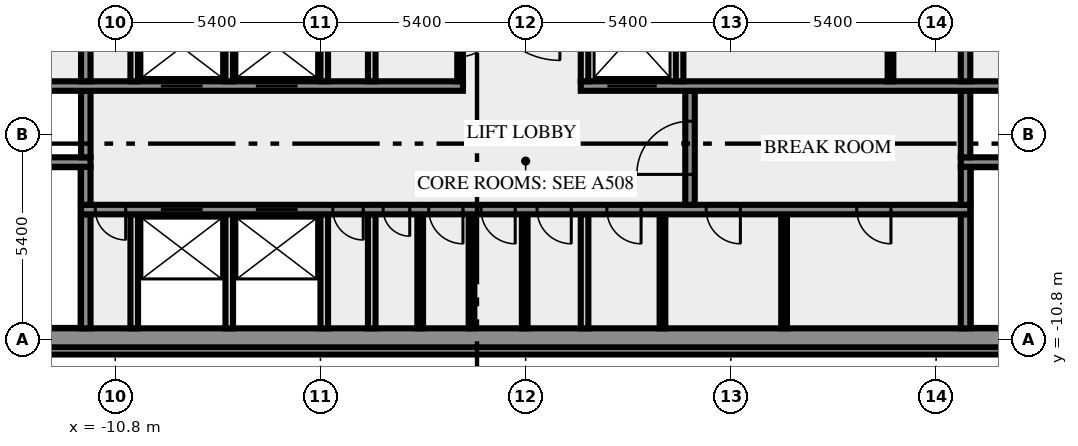
"""IFC4 building model, lengths in metres.
Left out: names, types, materials, properties, quantities, classifications, styles, units other than length and angle.
Written with IfcOpenShell. Run it as: python <this file> out.ifc"""

import sys

from ifc_helpers import new_model, si_unit, direction, frame, frame_2d, origin, place, context, subcontext, project, spatial, rectangle, extrude, element, fill, save


model = new_model("IFC4")
c1 = context("Model", 3, precision=1e-05, world=origin(), true_north=direction((0.0, 1.0)))
c2 = subcontext(c1, "Body", "Model", "MODEL_VIEW")
j1 = project(units=[si_unit("LENGTHUNIT", "METRE"), si_unit("PLANEANGLEUNIT", "RADIAN")], contexts=[c1])
p1 = place(None, origin())
s1 = spatial("IfcSite", under=j1, at=p1, CompositionType="ELEMENT")
p2 = place(p1, origin())
s2 = spatial("IfcBuilding", under=s1, at=p2, CompositionType="ELEMENT")
p3 = place(p2, frame((0.0, 0.0, 265.0)))
s3 = spatial("IfcBuildingStorey", under=s2, at=p3, CompositionType="ELEMENT", Elevation=265.0)
p4 = place(p3, frame((-17.444, -11.088, 0.0), z_axis=(0.0, 0.0, 1.0), x_axis=(1.0, 0.0, 0.0)))
e1 = element("IfcWall", 1, at=p4, inside=s3, PredefinedType="SOLIDWALL", context=c2, shape_type="SweptSolid", body=[
    extrude(rectangle(XDim=34.888, YDim=0.2, at=frame_2d((17.444, 0.0))), origin(), (0.0, 0.0, 1.0), 3.65),
])
p5 = place(p3, frame((-20.0, -10.75, 0.0), z_axis=(0.0, 0.0, 1.0), x_axis=(1.0, 0.0, 0.0)))
e2 = element("IfcWall", 2, at=p5, inside=s3, PredefinedType="SHEAR", context=c2, shape_type="SweptSolid", body=[
    extrude(rectangle(XDim=40.0, YDim=0.5, at=frame_2d((20.0, 0.0))), origin(), (0.0, 0.0, 1.0), 3.65),
])
p6 = place(p5, frame((0.8, 0.0, 1.0)))
e3 = element("IfcOpeningElement", 3, at=p6, cuts=e2, PredefinedType="OPENING", context=c2, shape_type="SweptSolid", body=[
    extrude(rectangle(XDim=1.2, YDim=1.2, at=frame_2d((0.6, 0.6))), frame((0.0, 0.26, 0.0), z_axis=(0.0, -1.0, 0.0), x_axis=(1.0, 0.0, 0.0)), (0.0, 0.0, 1.0), 0.52),
])
p7 = place(p5, frame((38.0, 0.0, 1.0)))
e4 = element("IfcOpeningElement", 4, at=p7, cuts=e2, PredefinedType="OPENING", context=c2, shape_type="SweptSolid", body=[
    extrude(rectangle(XDim=1.2, YDim=1.2, at=frame_2d((0.6, 0.6))), frame((0.0, 0.26, 0.0), z_axis=(0.0, -1.0, 0.0), x_axis=(1.0, 0.0, 0.0)), (0.0, 0.0, 1.0), 0.52),
])
p8 = place(p3, frame((-11.575, -10.5, 0.0), z_axis=(0.0, 0.0, 1.0), x_axis=(0.0, 1.0, 0.0)))
e5 = element("IfcWall", 5, at=p8, inside=s3, PredefinedType="SHEAR", context=c2, shape_type="SweptSolid", body=[
    extrude(rectangle(XDim=3.0, YDim=0.25, at=frame_2d((1.5, 0.0))), origin(), (0.0, 0.0, 1.0), 3.65),
])
for number, where, z_axis, x_axis in (
    (6, (-10.3, -10.5, 0.0), (0.0, 0.0, 1.0), (0.0, 1.0, 0.0)),
    (7, (-7.8, -10.5, 0.0), (0.0, 0.0, 1.0), (0.0, 1.0, 0.0)),
    (8, (-5.3, -10.5, 0.0), (0.0, 0.0, 1.0), (0.0, 1.0, 0.0)),
    (9, (-4.05, -10.5, 0.0), (0.0, 0.0, 1.0), (0.0, 1.0, 0.0)),
):
    element("IfcWall", number, at=place(p3, frame(where, z_axis=z_axis, x_axis=x_axis)), inside=s3, PredefinedType="SOLIDWALL", context=c2, shape_type="SweptSolid", body=[
        extrude(rectangle(XDim=3.0, YDim=0.2, at=frame_2d((1.5, 0.0))), origin(), (0.0, 0.0, 1.0), 3.65),
    ])
for number, where, z_axis, x_axis in (
    (10, (-2.775, -10.5, 0.0), (0.0, 0.0, 1.0), (0.0, 1.0, 0.0)),
    (11, (-1.425, -10.5, 0.0), (0.0, 0.0, 1.0), (0.0, 1.0, 0.0)),
    (12, (-0.025, -10.5, 0.0), (0.0, 0.0, 1.0), (0.0, 1.0, 0.0)),
):
    element("IfcWall", number, at=place(p3, frame(where, z_axis=z_axis, x_axis=x_axis)), inside=s3, PredefinedType="PARTITIONING", context=c2, shape_type="SweptSolid", body=[
        extrude(rectangle(XDim=3.0, YDim=0.15, at=frame_2d((1.5, 0.0))), origin(), (0.0, 0.0, 1.0), 3.65),
    ])
p9 = place(p3, frame((1.55, -10.5, 0.0), z_axis=(0.0, 0.0, 1.0), x_axis=(0.0, 1.0, 0.0)))
e13 = element("IfcWall", 13, at=p9, inside=s3, PredefinedType="SOLIDWALL", context=c2, shape_type="SweptSolid", body=[
    extrude(rectangle(XDim=3.0, YDim=0.2, at=frame_2d((1.5, 0.0))), origin(), (0.0, 0.0, 1.0), 3.65),
])
for number, where, z_axis, x_axis in (
    (14, (3.6, -10.5, 0.0), (0.0, 0.0, 1.0), (0.0, 1.0, 0.0)),
    (15, (6.8, -10.5, 0.0), (0.0, 0.0, 1.0), (0.0, 1.0, 0.0)),
):
    element("IfcWall", number, at=place(p3, frame(where, z_axis=z_axis, x_axis=x_axis)), inside=s3, PredefinedType="PARTITIONING", context=c2, shape_type="SweptSolid", body=[
        extrude(rectangle(XDim=3.0, YDim=0.15, at=frame_2d((1.5, 0.0))), origin(), (0.0, 0.0, 1.0), 3.65),
    ])
p10 = place(p3, frame((11.575, -10.5, 0.0), z_axis=(0.0, 0.0, 1.0), x_axis=(0.0, 1.0, 0.0)))
e16 = element("IfcWall", 16, at=p10, inside=s3, PredefinedType="SHEAR", context=c2, shape_type="SweptSolid", body=[
    extrude(rectangle(XDim=3.0, YDim=0.25, at=frame_2d((1.5, 0.0))), origin(), (0.0, 0.0, 1.0), 3.65),
])
p11 = place(p3, frame((11.7, -7.375, 0.0), z_axis=(0.0, 0.0, 1.0), x_axis=(-1.0, 0.0, 0.0)))
e17 = element("IfcWall", 17, at=p11, inside=s3, PredefinedType="SHEAR", context=c2, shape_type="SweptSolid", body=[
    extrude(rectangle(XDim=23.4, YDim=0.25, at=frame_2d((11.7, 0.0))), origin(), (0.0, 0.0, 1.0), 3.65),
])
p12 = place(p11, frame((22.225, 0.0, 0.0)))
e18 = element("IfcOpeningElement", 18, at=p12, cuts=e17, PredefinedType="OPENING", context=c2, shape_type="SweptSolid", body=[
    extrude(rectangle(XDim=0.8, YDim=2.1, at=frame_2d((0.4, 1.05))), frame((0.0, 0.135, 0.0), z_axis=(0.0, -1.0, 0.0), x_axis=(1.0, 0.0, 0.0)), (0.0, 0.0, 1.0), 0.27),
])
p13 = place(p11, frame((20.2, 0.0, 0.0)))
e19 = element("IfcOpeningElement", 19, at=p13, cuts=e17, PredefinedType="OPENING", context=c2, shape_type="SweptSolid", body=[
    extrude(rectangle(XDim=1.1, YDim=2.1, at=frame_2d((0.55, 1.05))), frame((0.0, 0.135, 0.0), z_axis=(0.0, -1.0, 0.0), x_axis=(1.0, 0.0, 0.0)), (0.0, 0.0, 1.0), 0.27),
])
p14 = place(p11, frame((17.7, 0.0, 0.0)))
e20 = element("IfcOpeningElement", 20, at=p14, cuts=e17, PredefinedType="OPENING", context=c2, shape_type="SweptSolid", body=[
    extrude(rectangle(XDim=1.1, YDim=2.1, at=frame_2d((0.55, 1.05))), frame((0.0, 0.135, 0.0), z_axis=(0.0, -1.0, 0.0), x_axis=(1.0, 0.0, 0.0)), (0.0, 0.0, 1.0), 0.27),
])
p15 = place(p11, frame((15.975, 0.0, 0.0)))
e21 = element("IfcOpeningElement", 21, at=p15, cuts=e17, PredefinedType="OPENING", context=c2, shape_type="SweptSolid", body=[
    extrude(rectangle(XDim=0.8, YDim=2.1, at=frame_2d((0.4, 1.05))), frame((0.0, 0.135, 0.0), z_axis=(0.0, -1.0, 0.0), x_axis=(1.0, 0.0, 0.0)), (0.0, 0.0, 1.0), 0.27),
])
p16 = place(p11, frame((14.75, 0.0, 0.0)))
e22 = element("IfcOpeningElement", 22, at=p16, cuts=e17, PredefinedType="OPENING", context=c2, shape_type="SweptSolid", body=[
    extrude(rectangle(XDim=0.7, YDim=2.1, at=frame_2d((0.35, 1.05))), frame((0.0, 0.135, 0.0), z_axis=(0.0, -1.0, 0.0), x_axis=(1.0, 0.0, 0.0)), (0.0, 0.0, 1.0), 0.27),
])
p17 = place(p11, frame((13.35, 0.0, 0.0)))
e23 = element("IfcOpeningElement", 23, at=p17, cuts=e17, PredefinedType="OPENING", context=c2, shape_type="SweptSolid", body=[
    extrude(rectangle(XDim=0.9, YDim=2.1, at=frame_2d((0.45, 1.05))), frame((0.0, 0.135, 0.0), z_axis=(0.0, -1.0, 0.0), x_axis=(1.0, 0.0, 0.0)), (0.0, 0.0, 1.0), 0.27),
])
p18 = place(p11, frame((11.975, 0.0, 0.0)))
e24 = element("IfcOpeningElement", 24, at=p18, cuts=e17, PredefinedType="OPENING", context=c2, shape_type="SweptSolid", body=[
    extrude(rectangle(XDim=0.9, YDim=2.1, at=frame_2d((0.45, 1.05))), frame((0.0, 0.135, 0.0), z_axis=(0.0, -1.0, 0.0), x_axis=(1.0, 0.0, 0.0)), (0.0, 0.0, 1.0), 0.27),
])
p19 = place(p11, frame((10.5, 0.0, 0.0)))
e25 = element("IfcOpeningElement", 25, at=p19, cuts=e17, PredefinedType="OPENING", context=c2, shape_type="SweptSolid", body=[
    extrude(rectangle(XDim=0.9, YDim=2.1, at=frame_2d((0.45, 1.05))), frame((0.0, 0.135, 0.0), z_axis=(0.0, -1.0, 0.0), x_axis=(1.0, 0.0, 0.0)), (0.0, 0.0, 1.0), 0.27),
])
p20 = place(p11, frame((8.663, 0.0, 0.0)))
e26 = element("IfcOpeningElement", 26, at=p20, cuts=e17, PredefinedType="OPENING", context=c2, shape_type="SweptSolid", body=[
    extrude(rectangle(XDim=0.9, YDim=2.1, at=frame_2d((0.45, 1.05))), frame((0.0, 0.135, 0.0), z_axis=(0.0, -1.0, 0.0), x_axis=(1.0, 0.0, 0.0)), (0.0, 0.0, 1.0), 0.27),
])
p21 = place(p11, frame((6.05, 0.0, 0.0)))
e27 = element("IfcOpeningElement", 27, at=p21, cuts=e17, PredefinedType="OPENING", context=c2, shape_type="SweptSolid", body=[
    extrude(rectangle(XDim=0.9, YDim=2.1, at=frame_2d((0.45, 1.05))), frame((0.0, 0.135, 0.0), z_axis=(0.0, -1.0, 0.0), x_axis=(1.0, 0.0, 0.0)), (0.0, 0.0, 1.0), 0.27),
])
p22 = place(p11, frame((2.088, 0.0, 0.0)))
e28 = element("IfcOpeningElement", 28, at=p22, cuts=e17, PredefinedType="OPENING", context=c2, shape_type="SweptSolid", body=[
    extrude(rectangle(XDim=0.9, YDim=2.1, at=frame_2d((0.45, 1.05))), frame((0.0, 0.135, 0.0), z_axis=(0.0, -1.0, 0.0), x_axis=(1.0, 0.0, 0.0)), (0.0, 0.0, 1.0), 0.27),
])
p23 = place(p3, frame((-11.575, -7.25, 0.0), z_axis=(0.0, 0.0, 1.0), x_axis=(0.0, 1.0, 0.0)))
e29 = element("IfcWall", 29, at=p23, inside=s3, PredefinedType="SHEAR", context=c2, shape_type="SweptSolid", body=[
    extrude(rectangle(XDim=1.0, YDim=0.25, at=frame_2d((0.5, 0.0))), origin(), (0.0, 0.0, 1.0), 3.65),
])
p24 = place(p3, frame((4.325, -7.25, 0.0), z_axis=(0.0, 0.0, 1.0), x_axis=(0.0, 1.0, 0.0)))
e30 = element("IfcWall", 30, at=p24, inside=s3, PredefinedType="SHEAR", context=c2, shape_type="SweptSolid", body=[
    extrude(rectangle(XDim=3.0, YDim=0.25, at=frame_2d((1.5, 0.0))), origin(), (0.0, 0.0, 1.0), 3.65),
])
p25 = place(p24, frame((0.8, 0.0, 0.0)))
e31 = element("IfcOpeningElement", 31, at=p25, cuts=e30, PredefinedType="OPENING", context=c2, shape_type="SweptSolid", body=[
    extrude(rectangle(XDim=1.4, YDim=2.1, at=frame_2d((0.7, 1.05))), frame((0.0, 0.135, 0.0), z_axis=(0.0, -1.0, 0.0), x_axis=(1.0, 0.0, 0.0)), (0.0, 0.0, 1.0), 0.27),
])
p26 = place(p3, frame((11.575, -7.25, 0.0), z_axis=(0.0, 0.0, 1.0), x_axis=(0.0, 1.0, 0.0)))
e32 = element("IfcWall", 32, at=p26, inside=s3, PredefinedType="SHEAR", context=c2, shape_type="SweptSolid", body=[
    extrude(rectangle(XDim=1.0, YDim=0.25, at=frame_2d((0.5, 0.0))), origin(), (0.0, 0.0, 1.0), 3.65),
])
p27 = place(p3, frame((-11.45, -6.125, 0.0), z_axis=(0.0, 0.0, 1.0), x_axis=(-1.0, 0.0, 0.0)))
e33 = element("IfcWall", 33, at=p27, inside=s3, PredefinedType="SHEAR", context=c2, shape_type="SweptSolid", body=[
    extrude(rectangle(XDim=8.05, YDim=0.25, at=frame_2d((4.025, 0.0))), origin(), (0.0, 0.0, 1.0), 3.65),
])
p28 = place(p27, frame((6.2, 0.0, 0.0)))
e34 = element("IfcOpeningElement", 34, at=p28, cuts=e33, PredefinedType="OPENING", context=c2, shape_type="SweptSolid", body=[
    extrude(rectangle(XDim=1.8, YDim=2.1, at=frame_2d((0.9, 1.05))), frame((0.0, 0.135, 0.0), z_axis=(0.0, -1.0, 0.0), x_axis=(1.0, 0.0, 0.0)), (0.0, 0.0, 1.0), 0.27),
])
p29 = place(p3, frame((19.5, -6.125, 0.0), z_axis=(0.0, 0.0, 1.0), x_axis=(-1.0, 0.0, 0.0)))
e35 = element("IfcWall", 35, at=p29, inside=s3, PredefinedType="SHEAR", context=c2, shape_type="SweptSolid", body=[
    extrude(rectangle(XDim=8.05, YDim=0.25, at=frame_2d((4.025, 0.0))), origin(), (0.0, 0.0, 1.0), 3.65),
])
p30 = place(p29, frame((0.05, 0.0, 0.0)))
e36 = element("IfcOpeningElement", 36, at=p30, cuts=e35, PredefinedType="OPENING", context=c2, shape_type="SweptSolid", body=[
    extrude(rectangle(XDim=1.8, YDim=2.1, at=frame_2d((0.9, 1.05))), frame((0.0, 0.135, 0.0), z_axis=(0.0, -1.0, 0.0), x_axis=(1.0, 0.0, 0.0)), (0.0, 0.0, 1.0), 0.27),
])
for number, where, z_axis, x_axis in (
    (37, (-11.575, -6.0, 0.0), (0.0, 0.0, 1.0), (0.0, 1.0, 0.0)),
    (38, (11.575, -6.0, 0.0), (0.0, 0.0, 1.0), (0.0, 1.0, 0.0)),
):
    element("IfcWall", number, at=place(p3, frame(where, z_axis=z_axis, x_axis=x_axis)), inside=s3, PredefinedType="SHEAR", context=c2, shape_type="SweptSolid", body=[
        extrude(rectangle(XDim=1.75, YDim=0.25, at=frame_2d((0.875, 0.0))), origin(), (0.0, 0.0, 1.0), 3.65),
    ])
p31 = place(p3, frame((-14.35, -4.125, 0.0), z_axis=(0.0, 0.0, 1.0), x_axis=(1.0, 0.0, 0.0)))
e39 = element("IfcWall", 39, at=p31, inside=s3, PredefinedType="SHEAR", context=c2, shape_type="SweptSolid", body=[
    extrude(rectangle(XDim=12.7, YDim=0.25, at=frame_2d((6.35, 0.0))), origin(), (0.0, 0.0, 1.0), 3.65),
])
p32 = place(p31, frame((4.75, 0.0, 0.0)))
e40 = element("IfcOpeningElement", 40, at=p32, cuts=e39, PredefinedType="OPENING", context=c2, shape_type="SweptSolid", body=[
    extrude(rectangle(XDim=1.1, YDim=2.1, at=frame_2d((0.55, 1.05))), frame((0.0, 0.135, 0.0), z_axis=(0.0, -1.0, 0.0), x_axis=(1.0, 0.0, 0.0)), (0.0, 0.0, 1.0), 0.27),
])
p33 = place(p31, frame((7.25, 0.0, 0.0)))
e41 = element("IfcOpeningElement", 41, at=p33, cuts=e39, PredefinedType="OPENING", context=c2, shape_type="SweptSolid", body=[
    extrude(rectangle(XDim=1.1, YDim=2.1, at=frame_2d((0.55, 1.05))), frame((0.0, 0.135, 0.0), z_axis=(0.0, -1.0, 0.0), x_axis=(1.0, 0.0, 0.0)), (0.0, 0.0, 1.0), 0.27),
])
p34 = place(p3, frame((1.45, -4.125, 0.0), z_axis=(0.0, 0.0, 1.0), x_axis=(1.0, 0.0, 0.0)))
e42 = element("IfcWall", 42, at=p34, inside=s3, PredefinedType="SHEAR", context=c2, shape_type="SweptSolid", body=[
    extrude(rectangle(XDim=12.9, YDim=0.25, at=frame_2d((6.45, 0.0))), origin(), (0.0, 0.0, 1.0), 3.65),
])
p35 = place(p34, frame((0.7, 0.0, 0.0)))
e43 = element("IfcOpeningElement", 43, at=p35, cuts=e42, PredefinedType="OPENING", context=c2, shape_type="SweptSolid", body=[
    extrude(rectangle(XDim=1.3, YDim=2.1, at=frame_2d((0.65, 1.05))), frame((0.0, 0.135, 0.0), z_axis=(0.0, -1.0, 0.0), x_axis=(1.0, 0.0, 0.0)), (0.0, 0.0, 1.0), 0.27),
])
p36 = place(p3, frame((-11.575, -4.0, 0.0), z_axis=(0.0, 0.0, 1.0), x_axis=(0.0, 1.0, 0.0)))
e44 = element("IfcWall", 44, at=p36, inside=s3, PredefinedType="SHEAR", context=c2, shape_type="SweptSolid", body=[
    extrude(rectangle(XDim=2.3, YDim=0.25, at=frame_2d((1.15, 0.0))), origin(), (0.0, 0.0, 1.0), 3.65),
])
for number, where, z_axis, x_axis in (
    (45, (-10.3, -4.0, 0.0), (0.0, 0.0, 1.0), (0.0, 1.0, 0.0)),
    (46, (-7.8, -4.0, 0.0), (0.0, 0.0, 1.0), (0.0, 1.0, 0.0)),
    (47, (-5.3, -4.0, 0.0), (0.0, 0.0, 1.0), (0.0, 1.0, 0.0)),
    (48, (-4.05, -4.0, 0.0), (0.0, 0.0, 1.0), (0.0, 1.0, 0.0)),
):
    element("IfcWall", number, at=place(p3, frame(where, z_axis=z_axis, x_axis=x_axis)), inside=s3, PredefinedType="SOLIDWALL", context=c2, shape_type="SweptSolid", body=[
        extrude(rectangle(XDim=2.3, YDim=0.2, at=frame_2d((1.15, 0.0))), origin(), (0.0, 0.0, 1.0), 3.65),
    ])
p37 = place(p3, frame((-1.725, -1.7, 0.0), z_axis=(0.0, 0.0, 1.0), x_axis=(0.0, -1.0, 0.0)))
e49 = element("IfcWall", 49, at=p37, inside=s3, PredefinedType="PARTITIONING", context=c2, shape_type="SweptSolid", body=[
    extrude(rectangle(XDim=2.3, YDim=0.15, at=frame_2d((1.15, 0.0))), origin(), (0.0, 0.0, 1.0), 3.65),
])
p38 = place(p37, frame((0.75, 0.0, 0.0)))
e50 = element("IfcOpeningElement", 50, at=p38, cuts=e49, PredefinedType="OPENING", context=c2, shape_type="SweptSolid", body=[
    extrude(rectangle(XDim=0.9, YDim=2.1, at=frame_2d((0.45, 1.05))), frame((0.0, 0.085, 0.0), z_axis=(0.0, -1.0, 0.0), x_axis=(1.0, 0.0, 0.0)), (0.0, 0.0, 1.0), 0.17),
])
for number, where, z_axis, x_axis in (
    (51, (1.55, -4.0, 0.0), (0.0, 0.0, 1.0), (0.0, 1.0, 0.0)),
    (52, (4.05, -4.0, 0.0), (0.0, 0.0, 1.0), (0.0, 1.0, 0.0)),
):
    element("IfcWall", number, at=place(p3, frame(where, z_axis=z_axis, x_axis=x_axis)), inside=s3, PredefinedType="SOLIDWALL", context=c2, shape_type="SweptSolid", body=[
        extrude(rectangle(XDim=2.3, YDim=0.2, at=frame_2d((1.15, 0.0))), origin(), (0.0, 0.0, 1.0), 3.65),
    ])
p39 = place(p3, frame((9.6, -4.0, 0.0), z_axis=(0.0, 0.0, 1.0), x_axis=(0.0, 1.0, 0.0)))
e53 = element("IfcWall", 53, at=p39, inside=s3, PredefinedType="PARTITIONING", context=c2, shape_type="SweptSolid", body=[
    extrude(rectangle(XDim=2.3, YDim=0.15, at=frame_2d((1.15, 0.0))), origin(), (0.0, 0.0, 1.0), 3.65),
])
p40 = place(p3, frame((11.575, -4.0, 0.0), z_axis=(0.0, 0.0, 1.0), x_axis=(0.0, 1.0, 0.0)))
e54 = element("IfcWall", 54, at=p40, inside=s3, PredefinedType="SHEAR", context=c2, shape_type="SweptSolid", body=[
    extrude(rectangle(XDim=2.3, YDim=0.25, at=frame_2d((1.15, 0.0))), origin(), (0.0, 0.0, 1.0), 3.65),
])
p41 = place(p12, origin())
e55 = element("IfcDoor", 55, at=p41, inside=s3, OperationType="SINGLE_SWING_RIGHT", PredefinedType="DOOR", context=c2, shape_type="SweptSolid", body=[
    extrude(rectangle(XDim=0.8, YDim=2.1, at=frame_2d((0.4, 1.05))), frame((0.0, 0.025, 0.0), z_axis=(0.0, -1.0, 0.0), x_axis=(1.0, 0.0, 0.0)), (0.0, 0.0, 1.0), 0.05),
])
fill(e18, e55)
p42 = place(p13, origin())
e56 = element("IfcDoor", 56, at=p42, inside=s3, OperationType="DOUBLE_DOOR_SLIDING", PredefinedType="DOOR", context=c2, shape_type="SweptSolid", body=[
    extrude(rectangle(XDim=1.1, YDim=2.1, at=frame_2d((0.55, 1.05))), frame((0.0, 0.025, 0.0), z_axis=(0.0, -1.0, 0.0), x_axis=(1.0, 0.0, 0.0)), (0.0, 0.0, 1.0), 0.05),
])
fill(e19, e56)
p43 = place(p14, origin())
e57 = element("IfcDoor", 57, at=p43, inside=s3, OperationType="DOUBLE_DOOR_SLIDING", PredefinedType="DOOR", context=c2, shape_type="SweptSolid", body=[
    extrude(rectangle(XDim=1.1, YDim=2.1, at=frame_2d((0.55, 1.05))), frame((0.0, 0.025, 0.0), z_axis=(0.0, -1.0, 0.0), x_axis=(1.0, 0.0, 0.0)), (0.0, 0.0, 1.0), 0.05),
])
fill(e20, e57)
p44 = place(p15, origin())
e58 = element("IfcDoor", 58, at=p44, inside=s3, OperationType="SINGLE_SWING_RIGHT", PredefinedType="DOOR", context=c2, shape_type="SweptSolid", body=[
    extrude(rectangle(XDim=0.8, YDim=2.1, at=frame_2d((0.4, 1.05))), frame((0.0, 0.025, 0.0), z_axis=(0.0, -1.0, 0.0), x_axis=(1.0, 0.0, 0.0)), (0.0, 0.0, 1.0), 0.05),
])
fill(e21, e58)
p45 = place(p16, origin())
e59 = element("IfcDoor", 59, at=p45, inside=s3, OperationType="SINGLE_SWING_RIGHT", PredefinedType="DOOR", context=c2, shape_type="SweptSolid", body=[
    extrude(rectangle(XDim=0.7, YDim=2.1, at=frame_2d((0.35, 1.05))), frame((0.0, 0.025, 0.0), z_axis=(0.0, -1.0, 0.0), x_axis=(1.0, 0.0, 0.0)), (0.0, 0.0, 1.0), 0.05),
])
fill(e22, e59)
p46 = place(p17, origin())
e60 = element("IfcDoor", 60, at=p46, inside=s3, OperationType="SINGLE_SWING_RIGHT", PredefinedType="DOOR", context=c2, shape_type="SweptSolid", body=[
    extrude(rectangle(XDim=0.9, YDim=2.1, at=frame_2d((0.45, 1.05))), frame((0.0, 0.025, 0.0), z_axis=(0.0, -1.0, 0.0), x_axis=(1.0, 0.0, 0.0)), (0.0, 0.0, 1.0), 0.05),
])
fill(e23, e60)
p47 = place(p18, origin())
e61 = element("IfcDoor", 61, at=p47, inside=s3, OperationType="SINGLE_SWING_RIGHT", PredefinedType="DOOR", context=c2, shape_type="SweptSolid", body=[
    extrude(rectangle(XDim=0.9, YDim=2.1, at=frame_2d((0.45, 1.05))), frame((0.0, 0.025, 0.0), z_axis=(0.0, -1.0, 0.0), x_axis=(1.0, 0.0, 0.0)), (0.0, 0.0, 1.0), 0.05),
])
fill(e24, e61)
p48 = place(p19, origin())
e62 = element("IfcDoor", 62, at=p48, inside=s3, OperationType="SINGLE_SWING_LEFT", PredefinedType="DOOR", context=c2, shape_type="SweptSolid", body=[
    extrude(rectangle(XDim=0.9, YDim=2.1, at=frame_2d((0.45, 1.05))), frame((0.0, 0.025, 0.0), z_axis=(0.0, -1.0, 0.0), x_axis=(1.0, 0.0, 0.0)), (0.0, 0.0, 1.0), 0.05),
])
fill(e25, e62)
p49 = place(p20, origin())
e63 = element("IfcDoor", 63, at=p49, inside=s3, OperationType="SINGLE_SWING_LEFT", PredefinedType="DOOR", context=c2, shape_type="SweptSolid", body=[
    extrude(rectangle(XDim=0.9, YDim=2.1, at=frame_2d((0.45, 1.05))), frame((0.0, 0.025, 0.0), z_axis=(0.0, -1.0, 0.0), x_axis=(1.0, 0.0, 0.0)), (0.0, 0.0, 1.0), 0.05),
])
fill(e26, e63)
p50 = place(p21, origin())
e64 = element("IfcDoor", 64, at=p50, inside=s3, OperationType="SINGLE_SWING_LEFT", PredefinedType="DOOR", context=c2, shape_type="SweptSolid", body=[
    extrude(rectangle(XDim=0.9, YDim=2.1, at=frame_2d((0.45, 1.05))), frame((0.0, 0.025, 0.0), z_axis=(0.0, -1.0, 0.0), x_axis=(1.0, 0.0, 0.0)), (0.0, 0.0, 1.0), 0.05),
])
fill(e27, e64)
p51 = place(p22, origin())
e65 = element("IfcDoor", 65, at=p51, inside=s3, OperationType="SINGLE_SWING_LEFT", PredefinedType="DOOR", context=c2, shape_type="SweptSolid", body=[
    extrude(rectangle(XDim=0.9, YDim=2.1, at=frame_2d((0.45, 1.05))), frame((0.0, 0.025, 0.0), z_axis=(0.0, -1.0, 0.0), x_axis=(1.0, 0.0, 0.0)), (0.0, 0.0, 1.0), 0.05),
])
fill(e28, e65)
p52 = place(p25, origin())
e66 = element("IfcDoor", 66, at=p52, inside=s3, OperationType="DOUBLE_DOOR_SINGLE_SWING", PredefinedType="DOOR", context=c2, shape_type="SweptSolid", body=[
    extrude(rectangle(XDim=1.4, YDim=2.1, at=frame_2d((0.7, 1.05))), frame((0.0, 0.025, 0.0), z_axis=(0.0, -1.0, 0.0), x_axis=(1.0, 0.0, 0.0)), (0.0, 0.0, 1.0), 0.05),
])
fill(e31, e66)
p53 = place(p32, origin())
e67 = element("IfcDoor", 67, at=p53, inside=s3, OperationType="DOUBLE_DOOR_SLIDING", PredefinedType="DOOR", context=c2, shape_type="SweptSolid", body=[
    extrude(rectangle(XDim=1.1, YDim=2.1, at=frame_2d((0.55, 1.05))), frame((0.0, 0.025, 0.0), z_axis=(0.0, -1.0, 0.0), x_axis=(1.0, 0.0, 0.0)), (0.0, 0.0, 1.0), 0.05),
])
fill(e40, e67)
p54 = place(p33, origin())
e68 = element("IfcDoor", 68, at=p54, inside=s3, OperationType="DOUBLE_DOOR_SLIDING", PredefinedType="DOOR", context=c2, shape_type="SweptSolid", body=[
    extrude(rectangle(XDim=1.1, YDim=2.1, at=frame_2d((0.55, 1.05))), frame((0.0, 0.025, 0.0), z_axis=(0.0, -1.0, 0.0), x_axis=(1.0, 0.0, 0.0)), (0.0, 0.0, 1.0), 0.05),
])
fill(e41, e68)
p55 = place(p35, origin())
e69 = element("IfcDoor", 69, at=p55, inside=s3, OperationType="DOUBLE_DOOR_SLIDING", PredefinedType="DOOR", context=c2, shape_type="SweptSolid", body=[
    extrude(rectangle(XDim=1.3, YDim=2.1, at=frame_2d((0.65, 1.05))), frame((0.0, 0.025, 0.0), z_axis=(0.0, -1.0, 0.0), x_axis=(1.0, 0.0, 0.0)), (0.0, 0.0, 1.0), 0.05),
])
fill(e43, e69)
p56 = place(p38, origin())
e70 = element("IfcDoor", 70, at=p56, inside=s3, OperationType="SINGLE_SWING_RIGHT", PredefinedType="DOOR", context=c2, shape_type="SweptSolid", body=[
    extrude(rectangle(XDim=0.9, YDim=2.1, at=frame_2d((0.45, 1.05))), frame((0.0, 0.025, 0.0), z_axis=(0.0, -1.0, 0.0), x_axis=(1.0, 0.0, 0.0)), (0.0, 0.0, 1.0), 0.05),
])
fill(e50, e70)
save(model, sys.argv[1])
